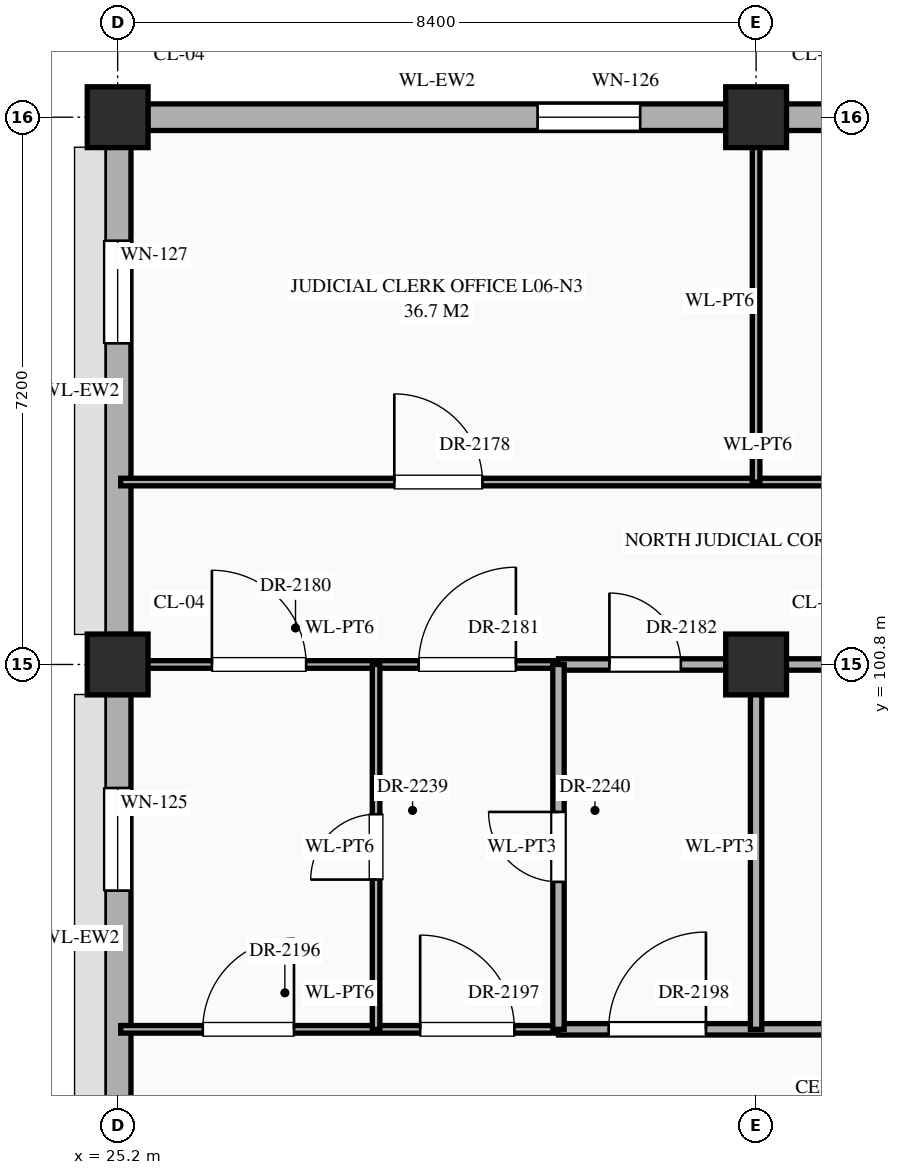
"""IFC4 building model, lengths in metres.
Left out: names, types, materials, properties, quantities, classifications, styles, units other than length and angle.
Written with IfcOpenShell. Run it as: python <this file> out.ifc"""

import sys

from ifc_helpers import new_model, si_unit, direction, frame, frame_2d, origin, origin_2d, place, context, subcontext, project, spatial, rectangle, extrude, element, fill, save


model = new_model("IFC4")
c1 = context("Model", 3, precision=1e-05, world=origin(), true_north=direction((0.0, 1.0)))
c2 = subcontext(c1, "Body", "Model", "MODEL_VIEW")
j1 = project(units=[si_unit("LENGTHUNIT", "METRE"), si_unit("PLANEANGLEUNIT", "RADIAN")], contexts=[c1])
p1 = place(None, origin())
s1 = spatial("IfcSite", under=j1, at=p1, CompositionType="ELEMENT")
p2 = place(p1, origin())
s2 = spatial("IfcBuilding", under=s1, at=p2, CompositionType="ELEMENT")
p3 = place(p2, frame((0.0, 0.0, 26.1)))
s3 = spatial("IfcBuildingStorey", under=s2, at=p3, CompositionType="ELEMENT", Elevation=26.1)
for number, where, z_axis, x_axis in (
    (1, (25.2, 100.8, 0.0), (0.0, 0.0, 1.0), (1.0, 0.0, 0.0)),
    (2, (25.2, 108.0, 0.0), (0.0, 0.0, 1.0), (1.0, 0.0, 0.0)),
    (3, (33.6, 100.8, 0.0), (0.0, 0.0, 1.0), (1.0, 0.0, 0.0)),
    (4, (33.6, 108.0, 0.0), (0.0, 0.0, 1.0), (1.0, 0.0, 0.0)),
):
    element("IfcColumn", number, at=place(p3, frame(where, z_axis=z_axis, x_axis=x_axis)), inside=s3, PredefinedType="COLUMN", context=c2, shape_type="SweptSolid", body=[
        extrude(rectangle(XDim=0.8, YDim=0.8, at=origin_2d()), origin(), (0.0, 0.0, 1.0), 4.5),
    ])
p4 = place(p3, frame((25.2, 93.995, 0.0), z_axis=(0.0, 0.0, 1.0), x_axis=(0.0, 1.0, 0.0)))
e5 = element("IfcWall", 5, at=p4, inside=s3, PredefinedType="STANDARD", context=c2, shape_type="SweptSolid", body=[
    extrude(rectangle(XDim=6.41, YDim=0.35, at=frame_2d((3.205, 0.0))), origin(), (0.0, 0.0, 1.0), 3.59),
])
p5 = place(p4, frame((3.83, 0.0, 0.85)))
e6 = element("IfcOpeningElement", 6, at=p5, cuts=e5, PredefinedType="OPENING", context=c2, shape_type="SweptSolid", body=[
    extrude(rectangle(XDim=1.35, YDim=1.56, at=frame_2d((0.675, 0.78))), frame((0.0, 0.187, 0.0), z_axis=(0.0, -1.0, 0.0), x_axis=(1.0, 0.0, 0.0)), (0.0, 0.0, 1.0), 0.374),
])
p6 = place(p3, frame((25.595, 108.0, 0.0), z_axis=(0.0, 0.0, 1.0), x_axis=(1.0, 0.0, 0.0)))
e7 = element("IfcWall", 7, at=p6, inside=s3, PredefinedType="STANDARD", context=c2, shape_type="SweptSolid", body=[
    extrude(rectangle(XDim=7.61, YDim=0.35, at=frame_2d((3.805, 0.0))), origin(), (0.0, 0.0, 1.0), 3.59),
])
p7 = place(p6, frame((5.13, 0.0, 0.85)))
e8 = element("IfcOpeningElement", 8, at=p7, cuts=e7, PredefinedType="OPENING", context=c2, shape_type="SweptSolid", body=[
    extrude(rectangle(XDim=1.35, YDim=1.74, at=frame_2d((0.675, 0.87))), frame((0.0, 0.187, 0.0), z_axis=(0.0, -1.0, 0.0), x_axis=(1.0, 0.0, 0.0)), (0.0, 0.0, 1.0), 0.374),
])
p8 = place(p3, frame((25.2, 101.195, 0.0), z_axis=(0.0, 0.0, 1.0), x_axis=(0.0, 1.0, 0.0)))
e9 = element("IfcWall", 9, at=p8, inside=s3, PredefinedType="STANDARD", context=c2, shape_type="SweptSolid", body=[
    extrude(rectangle(XDim=6.41, YDim=0.35, at=frame_2d((3.205, 0.0))), origin(), (0.0, 0.0, 1.0), 3.59),
])
p9 = place(p8, frame((3.83, 0.0, 0.85)))
e10 = element("IfcOpeningElement", 10, at=p9, cuts=e9, PredefinedType="OPENING", context=c2, shape_type="SweptSolid", body=[
    extrude(rectangle(XDim=1.35, YDim=1.74, at=frame_2d((0.675, 0.87))), frame((0.0, 0.187, 0.0), z_axis=(0.0, -1.0, 0.0), x_axis=(1.0, 0.0, 0.0)), (0.0, 0.0, 1.0), 0.374),
])
p10 = place(p3, frame((33.995, 108.0, 0.0), z_axis=(0.0, 0.0, 1.0), x_axis=(1.0, 0.0, 0.0)))
e11 = element("IfcWall", 11, at=p10, inside=s3, PredefinedType="STANDARD", context=c2, shape_type="SweptSolid", body=[
    extrude(rectangle(XDim=7.61, YDim=0.35, at=frame_2d((3.805, 0.0))), origin(), (0.0, 0.0, 1.0), 3.59),
])
p11 = place(p10, frame((5.13, 0.0, 0.85)))
e12 = element("IfcOpeningElement", 12, at=p11, cuts=e11, PredefinedType="OPENING", context=c2, shape_type="SweptSolid", body=[
    extrude(rectangle(XDim=1.35, YDim=1.92, at=frame_2d((0.675, 0.96))), frame((0.0, 0.187, 0.0), z_axis=(0.0, -1.0, 0.0), x_axis=(1.0, 0.0, 0.0)), (0.0, 0.0, 1.0), 0.374),
])
p12 = place(p3, frame((25.24, 96.0, 0.0), z_axis=(0.0, 0.0, 1.0), x_axis=(1.0, 0.0, 0.0)))
e13 = element("IfcWall", 13, at=p12, inside=s3, PredefinedType="STANDARD", context=c2, shape_type="SweptSolid", body=[
    extrude(rectangle(XDim=5.76, YDim=0.1, at=frame_2d((2.88, 0.0))), origin(), (0.0, 0.0, 1.0), 4.24),
])
p13 = place(p12, frame((1.08, 0.0, 0.0)))
e14 = element("IfcOpeningElement", 14, at=p13, cuts=e13, PredefinedType="OPENING", context=c2, shape_type="SweptSolid", body=[
    extrude(rectangle(XDim=1.2, YDim=2.35, at=frame_2d((0.6, 1.175))), frame((0.0, 0.062, 0.0), z_axis=(0.0, -1.0, 0.0), x_axis=(1.0, 0.0, 0.0)), (0.0, 0.0, 1.0), 0.124),
])
p14 = place(p12, frame((3.94, 0.0, 0.0)))
e15 = element("IfcOpeningElement", 15, at=p14, cuts=e13, PredefinedType="OPENING", context=c2, shape_type="SweptSolid", body=[
    extrude(rectangle(XDim=1.24, YDim=2.3, at=frame_2d((0.62, 1.15))), frame((0.0, 0.062, 0.0), z_axis=(0.0, -1.0, 0.0), x_axis=(1.0, 0.0, 0.0)), (0.0, 0.0, 1.0), 0.124),
])
p15 = place(p3, frame((31.0, 96.0, 0.0), z_axis=(0.0, 0.0, 1.0), x_axis=(1.0, 0.0, 0.0)))
e16 = element("IfcWall", 16, at=p15, inside=s3, PredefinedType="STANDARD", context=c2, shape_type="SweptSolid", body=[
    extrude(rectangle(XDim=19.4, YDim=0.15, at=frame_2d((9.7, 0.0))), origin(), (0.0, 0.0, 1.0), 4.24),
])
p16 = place(p15, frame((0.66, 0.0, 0.0)))
e17 = element("IfcOpeningElement", 17, at=p16, cuts=e16, PredefinedType="OPENING", context=c2, shape_type="SweptSolid", body=[
    extrude(rectangle(XDim=1.28, YDim=2.35, at=frame_2d((0.64, 1.175))), frame((0.0, 0.087, 0.0), z_axis=(0.0, -1.0, 0.0), x_axis=(1.0, 0.0, 0.0)), (0.0, 0.0, 1.0), 0.174),
])
p17 = place(p15, frame((6.33, 0.0, 0.0)))
e18 = element("IfcOpeningElement", 18, at=p17, cuts=e16, PredefinedType="OPENING", context=c2, shape_type="SweptSolid", body=[
    extrude(rectangle(XDim=0.94, YDim=2.3, at=frame_2d((0.47, 1.15))), frame((0.0, 0.087, 0.0), z_axis=(0.0, -1.0, 0.0), x_axis=(1.0, 0.0, 0.0)), (0.0, 0.0, 1.0), 0.174),
])
p18 = place(p15, frame((14.71, 0.0, 0.0)))
e19 = element("IfcOpeningElement", 19, at=p18, cuts=e16, PredefinedType="OPENING", context=c2, shape_type="SweptSolid", body=[
    extrude(rectangle(XDim=0.98, YDim=2.35, at=frame_2d((0.49, 1.175))), frame((0.0, 0.087, 0.0), z_axis=(0.0, -1.0, 0.0), x_axis=(1.0, 0.0, 0.0)), (0.0, 0.0, 1.0), 0.174),
])
p19 = place(p3, frame((25.24, 100.8, 0.0), z_axis=(0.0, 0.0, 1.0), x_axis=(1.0, 0.0, 0.0)))
e20 = element("IfcWall", 20, at=p19, inside=s3, PredefinedType="STANDARD", context=c2, shape_type="SweptSolid", body=[
    extrude(rectangle(XDim=5.76, YDim=0.1, at=frame_2d((2.88, 0.0))), origin(), (0.0, 0.0, 1.0), 3.39),
])
p20 = place(p19, frame((1.2, 0.0, 0.0)))
e21 = element("IfcOpeningElement", 21, at=p20, cuts=e20, PredefinedType="OPENING", context=c2, shape_type="SweptSolid", body=[
    extrude(rectangle(XDim=1.24, YDim=2.3, at=frame_2d((0.62, 1.15))), frame((0.0, 0.062, 0.0), z_axis=(0.0, -1.0, 0.0), x_axis=(1.0, 0.0, 0.0)), (0.0, 0.0, 1.0), 0.124),
])
p21 = place(p19, frame((3.92, 0.0, 0.0)))
e22 = element("IfcOpeningElement", 22, at=p21, cuts=e20, PredefinedType="OPENING", context=c2, shape_type="SweptSolid", body=[
    extrude(rectangle(XDim=1.28, YDim=2.35, at=frame_2d((0.64, 1.175))), frame((0.0, 0.062, 0.0), z_axis=(0.0, -1.0, 0.0), x_axis=(1.0, 0.0, 0.0)), (0.0, 0.0, 1.0), 0.124),
])
p22 = place(p3, frame((31.0, 100.8, 0.0), z_axis=(0.0, 0.0, 1.0), x_axis=(1.0, 0.0, 0.0)))
e23 = element("IfcWall", 23, at=p22, inside=s3, PredefinedType="STANDARD", context=c2, shape_type="SweptSolid", body=[
    extrude(rectangle(XDim=11.0, YDim=0.15, at=frame_2d((5.5, 0.0))), origin(), (0.0, 0.0, 1.0), 3.39),
])
p23 = place(p22, frame((0.67, 0.0, 0.0)))
e24 = element("IfcOpeningElement", 24, at=p23, cuts=e23, PredefinedType="OPENING", context=c2, shape_type="SweptSolid", body=[
    extrude(rectangle(XDim=0.94, YDim=2.3, at=frame_2d((0.47, 1.15))), frame((0.0, 0.087, 0.0), z_axis=(0.0, -1.0, 0.0), x_axis=(1.0, 0.0, 0.0)), (0.0, 0.0, 1.0), 0.174),
])
p24 = place(p22, frame((6.31, 0.0, 0.0)))
e25 = element("IfcOpeningElement", 25, at=p24, cuts=e23, PredefinedType="OPENING", context=c2, shape_type="SweptSolid", body=[
    extrude(rectangle(XDim=0.98, YDim=2.35, at=frame_2d((0.49, 1.175))), frame((0.0, 0.087, 0.0), z_axis=(0.0, -1.0, 0.0), x_axis=(1.0, 0.0, 0.0)), (0.0, 0.0, 1.0), 0.174),
])
p25 = place(p3, frame((25.24, 103.2, 0.0), z_axis=(0.0, 0.0, 1.0), x_axis=(1.0, 0.0, 0.0)))
e26 = element("IfcWall", 26, at=p25, inside=s3, PredefinedType="STANDARD", context=c2, shape_type="SweptSolid", body=[
    extrude(rectangle(XDim=16.76, YDim=0.1, at=frame_2d((8.38, 0.0))), origin(), (0.0, 0.0, 1.0), 4.24),
])
p26 = place(p25, frame((3.6, 0.0, 0.0)))
e27 = element("IfcOpeningElement", 27, at=p26, cuts=e26, PredefinedType="OPENING", context=c2, shape_type="SweptSolid", body=[
    extrude(rectangle(XDim=1.16, YDim=2.3, at=frame_2d((0.58, 1.15))), frame((0.0, 0.062, 0.0), z_axis=(0.0, -1.0, 0.0), x_axis=(1.0, 0.0, 0.0)), (0.0, 0.0, 1.0), 0.124),
])
p27 = place(p25, frame((11.96, 0.0, 0.0)))
e28 = element("IfcOpeningElement", 28, at=p27, cuts=e26, PredefinedType="OPENING", context=c2, shape_type="SweptSolid", body=[
    extrude(rectangle(XDim=1.2, YDim=2.35, at=frame_2d((0.6, 1.175))), frame((0.0, 0.062, 0.0), z_axis=(0.0, -1.0, 0.0), x_axis=(1.0, 0.0, 0.0)), (0.0, 0.0, 1.0), 0.124),
])
p28 = place(p3, frame((28.6, 96.0, 0.0), z_axis=(0.0, 0.0, 1.0), x_axis=(0.0, 1.0, 0.0)))
e29 = element("IfcWall", 29, at=p28, inside=s3, PredefinedType="STANDARD", context=c2, shape_type="SweptSolid", body=[
    extrude(rectangle(XDim=4.8, YDim=0.1, at=frame_2d((2.4, 0.0))), origin(), (0.0, 0.0, 1.0), 4.24),
])
p29 = place(p28, frame((1.97, 0.0, 0.0)))
e30 = element("IfcOpeningElement", 30, at=p29, cuts=e29, PredefinedType="OPENING", context=c2, shape_type="SweptSolid", body=[
    extrude(rectangle(XDim=0.86, YDim=2.1, at=frame_2d((0.43, 1.05))), frame((0.0, 0.062, 0.0), z_axis=(0.0, -1.0, 0.0), x_axis=(1.0, 0.0, 0.0)), (0.0, 0.0, 1.0), 0.124),
])
p30 = place(p3, frame((31.0, 96.0, 0.0), z_axis=(0.0, 0.0, 1.0), x_axis=(0.0, 1.0, 0.0)))
e31 = element("IfcWall", 31, at=p30, inside=s3, PredefinedType="STANDARD", context=c2, shape_type="SweptSolid", body=[
    extrude(rectangle(XDim=4.8, YDim=0.15, at=frame_2d((2.4, 0.0))), origin(), (0.0, 0.0, 1.0), 4.24),
])
p31 = place(p30, frame((1.94, 0.0, 0.0)))
e32 = element("IfcOpeningElement", 32, at=p31, cuts=e31, PredefinedType="OPENING", context=c2, shape_type="SweptSolid", body=[
    extrude(rectangle(XDim=0.92, YDim=2.15, at=frame_2d((0.46, 1.075))), frame((0.0, 0.087, 0.0), z_axis=(0.0, -1.0, 0.0), x_axis=(1.0, 0.0, 0.0)), (0.0, 0.0, 1.0), 0.174),
])
p32 = place(p3, frame((33.6, 96.0, 0.0), z_axis=(0.0, 0.0, 1.0), x_axis=(0.0, 1.0, 0.0)))
e33 = element("IfcWall", 33, at=p32, inside=s3, PredefinedType="STANDARD", context=c2, shape_type="SweptSolid", body=[
    extrude(rectangle(XDim=4.8, YDim=0.15, at=frame_2d((2.4, 0.0))), origin(), (0.0, 0.0, 1.0), 4.24),
])
p33 = place(p3, frame((33.6, 103.2, 0.0), z_axis=(0.0, 0.0, 1.0), x_axis=(0.0, 1.0, 0.0)))
e34 = element("IfcWall", 34, at=p33, inside=s3, PredefinedType="STANDARD", context=c2, shape_type="SweptSolid", body=[
    extrude(rectangle(XDim=4.76, YDim=0.1, at=frame_2d((2.38, 0.0))), origin(), (0.0, 0.0, 1.0), 3.49),
])
p34 = place(p5, origin())
e35 = element("IfcWindow", 35, at=p34, inside=s3, PartitioningType="SINGLE_PANEL", PredefinedType="WINDOW", context=c2, shape_type="SweptSolid", body=[
    extrude(rectangle(XDim=1.35, YDim=1.56, at=frame_2d((0.675, 0.78))), frame((0.0, 0.03, 0.0), z_axis=(0.0, -1.0, 0.0), x_axis=(1.0, 0.0, 0.0)), (0.0, 0.0, 1.0), 0.06),
])
fill(e6, e35)
p35 = place(p7, origin())
e36 = element("IfcWindow", 36, at=p35, inside=s3, PartitioningType="SINGLE_PANEL", PredefinedType="WINDOW", context=c2, shape_type="SweptSolid", body=[
    extrude(rectangle(XDim=1.35, YDim=1.74, at=frame_2d((0.675, 0.87))), frame((0.0, 0.03, 0.0), z_axis=(0.0, -1.0, 0.0), x_axis=(1.0, 0.0, 0.0)), (0.0, 0.0, 1.0), 0.06),
])
fill(e8, e36)
p36 = place(p9, origin())
e37 = element("IfcWindow", 37, at=p36, inside=s3, PartitioningType="SINGLE_PANEL", PredefinedType="WINDOW", context=c2, shape_type="SweptSolid", body=[
    extrude(rectangle(XDim=1.35, YDim=1.74, at=frame_2d((0.675, 0.87))), frame((0.0, 0.03, 0.0), z_axis=(0.0, -1.0, 0.0), x_axis=(1.0, 0.0, 0.0)), (0.0, 0.0, 1.0), 0.06),
])
fill(e10, e37)
p37 = place(p26, origin())
e38 = element("IfcDoor", 38, at=p37, inside=s3, OperationType="SINGLE_SWING_LEFT", PredefinedType="DOOR", context=c2, shape_type="SweptSolid", body=[
    extrude(rectangle(XDim=1.16, YDim=2.3, at=frame_2d((0.58, 1.15))), frame((0.0, 0.025, 0.0), z_axis=(0.0, -1.0, 0.0), x_axis=(1.0, 0.0, 0.0)), (0.0, 0.0, 1.0), 0.05),
])
fill(e27, e38)
p38 = place(p20, origin())
e39 = element("IfcDoor", 39, at=p38, inside=s3, OperationType="SINGLE_SWING_LEFT", PredefinedType="DOOR", context=c2, shape_type="SweptSolid", body=[
    extrude(rectangle(XDim=1.24, YDim=2.3, at=frame_2d((0.62, 1.15))), frame((0.0, 0.025, 0.0), z_axis=(0.0, -1.0, 0.0), x_axis=(1.0, 0.0, 0.0)), (0.0, 0.0, 1.0), 0.05),
])
fill(e21, e39)
p39 = place(p21, origin())
e40 = element("IfcDoor", 40, at=p39, inside=s3, OperationType="SINGLE_SWING_RIGHT", PredefinedType="DOOR", context=c2, shape_type="SweptSolid", body=[
    extrude(rectangle(XDim=1.28, YDim=2.35, at=frame_2d((0.64, 1.175))), frame((0.0, 0.025, 0.0), z_axis=(0.0, -1.0, 0.0), x_axis=(1.0, 0.0, 0.0)), (0.0, 0.0, 1.0), 0.05),
])
fill(e22, e40)
p40 = place(p23, origin())
e41 = element("IfcDoor", 41, at=p40, inside=s3, OperationType="SINGLE_SWING_LEFT", PredefinedType="DOOR", context=c2, shape_type="SweptSolid", body=[
    extrude(rectangle(XDim=0.94, YDim=2.3, at=frame_2d((0.47, 1.15))), frame((0.0, 0.025, 0.0), z_axis=(0.0, -1.0, 0.0), x_axis=(1.0, 0.0, 0.0)), (0.0, 0.0, 1.0), 0.05),
])
fill(e24, e41)
p41 = place(p13, origin())
e42 = element("IfcDoor", 42, at=p41, inside=s3, OperationType="SINGLE_SWING_RIGHT", PredefinedType="DOOR", context=c2, shape_type="SweptSolid", body=[
    extrude(rectangle(XDim=1.2, YDim=2.35, at=frame_2d((0.6, 1.175))), frame((0.0, 0.025, 0.0), z_axis=(0.0, -1.0, 0.0), x_axis=(1.0, 0.0, 0.0)), (0.0, 0.0, 1.0), 0.05),
])
fill(e14, e42)
p42 = place(p14, origin())
e43 = element("IfcDoor", 43, at=p42, inside=s3, OperationType="SINGLE_SWING_LEFT", PredefinedType="DOOR", context=c2, shape_type="SweptSolid", body=[
    extrude(rectangle(XDim=1.24, YDim=2.3, at=frame_2d((0.62, 1.15))), frame((0.0, 0.025, 0.0), z_axis=(0.0, -1.0, 0.0), x_axis=(1.0, 0.0, 0.0)), (0.0, 0.0, 1.0), 0.05),
])
fill(e15, e43)
p43 = place(p16, origin())
e44 = element("IfcDoor", 44, at=p43, inside=s3, OperationType="SINGLE_SWING_RIGHT", PredefinedType="DOOR", context=c2, shape_type="SweptSolid", body=[
    extrude(rectangle(XDim=1.28, YDim=2.35, at=frame_2d((0.64, 1.175))), frame((0.0, 0.025, 0.0), z_axis=(0.0, -1.0, 0.0), x_axis=(1.0, 0.0, 0.0)), (0.0, 0.0, 1.0), 0.05),
])
fill(e17, e44)
p44 = place(p29, origin())
e45 = element("IfcDoor", 45, at=p44, inside=s3, OperationType="SINGLE_SWING_LEFT", PredefinedType="DOOR", context=c2, shape_type="SweptSolid", body=[
    extrude(rectangle(XDim=0.86, YDim=2.1, at=frame_2d((0.43, 1.05))), frame((0.0, 0.025, 0.0), z_axis=(0.0, -1.0, 0.0), x_axis=(1.0, 0.0, 0.0)), (0.0, 0.0, 1.0), 0.05),
])
fill(e30, e45)
p45 = place(p31, origin())
e46 = element("IfcDoor", 46, at=p45, inside=s3, OperationType="SINGLE_SWING_RIGHT", PredefinedType="DOOR", context=c2, shape_type="SweptSolid", body=[
    extrude(rectangle(XDim=0.92, YDim=2.15, at=frame_2d((0.46, 1.075))), frame((0.0, 0.025, 0.0), z_axis=(0.0, -1.0, 0.0), x_axis=(1.0, 0.0, 0.0)), (0.0, 0.0, 1.0), 0.05),
])
fill(e32, e46)
save(model, sys.argv[1])
